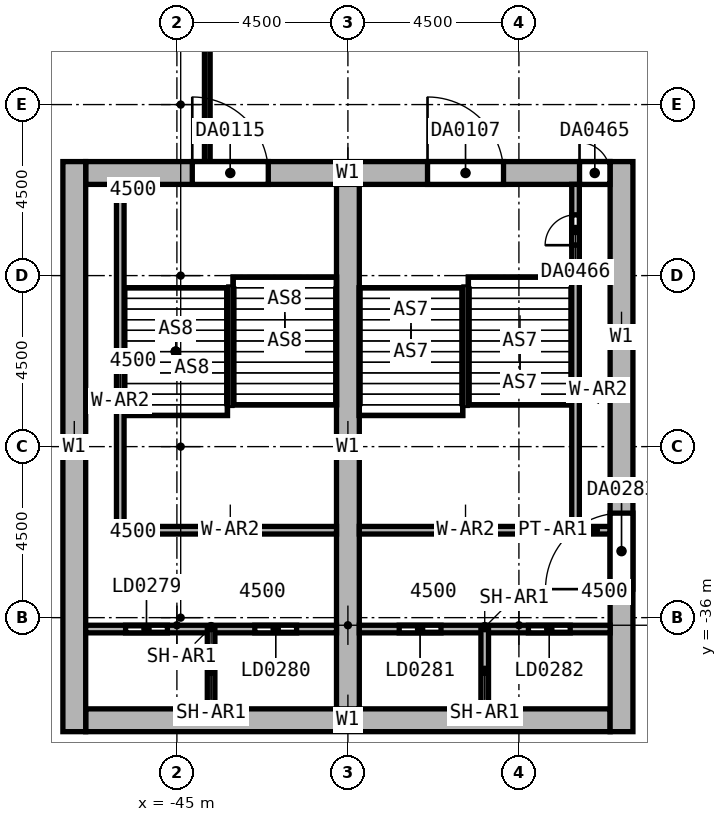
"""IFC4 building model, lengths in metres.
Left out: names, types, materials, properties, quantities, classifications, styles, units other than length and angle.
Written with IfcOpenShell. Run it as: python <this file> out.ifc"""

import sys

from ifc_helpers import new_model, si_unit, direction, frame, frame_2d, origin, place, context, subcontext, project, spatial, rectangle, extrude, element, fill, save


model = new_model("IFC4")
c1 = context("Model", 3, precision=1e-05, world=origin(), true_north=direction((0.0, 1.0)))
c2 = subcontext(c1, "Body", "Model", "MODEL_VIEW")
j1 = project(units=[si_unit("LENGTHUNIT", "METRE"), si_unit("PLANEANGLEUNIT", "RADIAN")], contexts=[c1])
p1 = place(None, origin())
s1 = spatial("IfcSite", under=j1, at=p1, CompositionType="ELEMENT")
p2 = place(p1, origin())
s2 = spatial("IfcBuilding", under=s1, at=p2, CompositionType="ELEMENT")
p3 = place(p2, frame((0.0, 0.0, 44.0)))
s3 = spatial("IfcBuildingStorey", under=s2, at=p3, CompositionType="ELEMENT", Elevation=44.0)
p4 = place(p3, frame((-47.4, -24.3, 0.0), z_axis=(0.0, 0.0, 1.0), x_axis=(1.0, 0.0, 0.0)))
e1 = element("IfcWall", 1, at=p4, inside=s3, PredefinedType="SHEAR", context=c2, shape_type="SweptSolid", body=[
    extrude(rectangle(XDim=13.8, YDim=0.6, at=frame_2d((6.9, 0.0))), origin(), (0.0, 0.0, 1.0), 8.0),
])
p5 = place(p4, frame((8.995, 0.0, 0.0)))
e2 = element("IfcOpeningElement", 2, at=p5, cuts=e1, PredefinedType="OPENING", context=c2, shape_type="SweptSolid", body=[
    extrude(rectangle(XDim=2.0, YDim=2.4, at=frame_2d((1.0, 1.2))), frame((0.0, 0.3, 0.0), z_axis=(0.0, -1.0, 0.0), x_axis=(1.0, 0.0, 0.0)), (0.0, 0.0, 1.0), 0.6),
])
p6 = place(p4, frame((2.805, 0.0, 0.0)))
e3 = element("IfcOpeningElement", 3, at=p6, cuts=e1, PredefinedType="OPENING", context=c2, shape_type="SweptSolid", body=[
    extrude(rectangle(XDim=2.0, YDim=2.4, at=frame_2d((1.0, 1.2))), frame((0.0, 0.3, 0.0), z_axis=(0.0, -1.0, 0.0), x_axis=(1.0, 0.0, 0.0)), (0.0, 0.0, 1.0), 0.6),
])
p7 = place(p4, frame((12.995, 0.0, 0.0)))
e4 = element("IfcOpeningElement", 4, at=p7, cuts=e1, PredefinedType="OPENING", context=c2, shape_type="SweptSolid", body=[
    extrude(rectangle(XDim=0.8, YDim=2.1, at=frame_2d((0.4, 1.05))), frame((0.0, 0.3, 0.0), z_axis=(0.0, -1.0, 0.0), x_axis=(1.0, 0.0, 0.0)), (0.0, 0.0, 1.0), 0.6),
])
p8 = place(p3, frame((-47.4, -38.7, 0.0), z_axis=(0.0, 0.0, 1.0), x_axis=(1.0, 0.0, 0.0)))
e5 = element("IfcWall", 5, at=p8, inside=s3, PredefinedType="SHEAR", context=c2, shape_type="SweptSolid", body=[
    extrude(rectangle(XDim=13.8, YDim=0.6, at=frame_2d((6.9, 0.0))), origin(), (0.0, 0.0, 1.0), 8.0),
])
p9 = place(p3, frame((-47.7, -39.0, 0.0), z_axis=(0.0, 0.0, 1.0), x_axis=(0.0, 1.0, 0.0)))
e6 = element("IfcWall", 6, at=p9, inside=s3, PredefinedType="SHEAR", context=c2, shape_type="SweptSolid", body=[
    extrude(rectangle(XDim=15.0, YDim=0.6, at=frame_2d((7.5, 0.0))), origin(), (0.0, 0.0, 1.0), 8.0),
])
p10 = place(p3, frame((-33.3, -39.0, 0.0), z_axis=(0.0, 0.0, 1.0), x_axis=(0.0, 1.0, 0.0)))
e7 = element("IfcWall", 7, at=p10, inside=s3, PredefinedType="SHEAR", context=c2, shape_type="SweptSolid", body=[
    extrude(rectangle(XDim=15.0, YDim=0.6, at=frame_2d((7.5, 0.0))), origin(), (0.0, 0.0, 1.0), 8.0),
])
p11 = place(p10, frame((3.75, 0.0, 0.0)))
e8 = element("IfcOpeningElement", 8, at=p11, cuts=e7, PredefinedType="OPENING", context=c2, shape_type="SweptSolid", body=[
    extrude(rectangle(XDim=2.0, YDim=2.4, at=frame_2d((1.0, 1.2))), frame((0.0, 0.3, 0.0), z_axis=(0.0, -1.0, 0.0), x_axis=(1.0, 0.0, 0.0)), (0.0, 0.0, 1.0), 0.6),
])
p12 = place(p3, frame((-40.5, -38.4, 0.0), z_axis=(0.0, 0.0, 1.0), x_axis=(0.0, 1.0, 0.0)))
e9 = element("IfcWall", 9, at=p12, inside=s3, PredefinedType="SHEAR", context=c2, shape_type="SweptSolid", body=[
    extrude(rectangle(XDim=13.8, YDim=0.6, at=frame_2d((6.9, 0.0))), origin(), (0.0, 0.0, 1.0), 8.0),
])
p13 = place(p3, frame((-34.51, -33.8, 0.0), z_axis=(0.0, 0.0, 1.0), x_axis=(0.0, 1.0, 0.0)))
e10 = element("IfcWall", 10, at=p13, inside=s3, PredefinedType="SOLIDWALL", context=c2, shape_type="SweptSolid", body=[
    extrude(rectangle(XDim=9.2, YDim=0.2, at=frame_2d((4.6, 0.0))), origin(), (0.0, 0.0, 1.0), 8.0),
])
p14 = place(p13, frame((7.6, 0.0, 0.0)))
e11 = element("IfcOpeningElement", 11, at=p14, cuts=e10, PredefinedType="OPENING", context=c2, shape_type="SweptSolid", body=[
    extrude(rectangle(XDim=0.8, YDim=2.1, at=frame_2d((0.4, 1.05))), frame((0.0, 0.1, 0.0), z_axis=(0.0, -1.0, 0.0), x_axis=(1.0, 0.0, 0.0)), (0.0, 0.0, 1.0), 0.2),
])
p15 = place(p3, frame((-40.2, -33.7, 0.0), z_axis=(0.0, 0.0, 1.0), x_axis=(1.0, 0.0, 0.0)))
e12 = element("IfcWall", 12, at=p15, inside=s3, PredefinedType="SOLIDWALL", context=c2, shape_type="SweptSolid", body=[
    extrude(rectangle(XDim=5.59, YDim=0.2, at=frame_2d((2.795, 0.0))), origin(), (0.0, 0.0, 1.0), 8.0),
])
p16 = place(p3, frame((-46.49, -33.8, 0.0), z_axis=(0.0, 0.0, 1.0), x_axis=(0.0, 1.0, 0.0)))
e13 = element("IfcWall", 13, at=p16, inside=s3, PredefinedType="SOLIDWALL", context=c2, shape_type="SweptSolid", body=[
    extrude(rectangle(XDim=9.2, YDim=0.2, at=frame_2d((4.6, 0.0))), origin(), (0.0, 0.0, 1.0), 8.0),
])
p17 = place(p3, frame((-46.39, -33.7, 0.0), z_axis=(0.0, 0.0, 1.0), x_axis=(1.0, 0.0, 0.0)))
e14 = element("IfcWall", 14, at=p17, inside=s3, PredefinedType="SOLIDWALL", context=c2, shape_type="SweptSolid", body=[
    extrude(rectangle(XDim=5.59, YDim=0.2, at=frame_2d((2.795, 0.0))), origin(), (0.0, 0.0, 1.0), 8.0),
])
p18 = place(p3, frame((-47.4, -36.3, 0.0), z_axis=(0.0, 0.0, 1.0), x_axis=(1.0, 0.0, 0.0)))
e15 = element("IfcWall", 15, at=p18, inside=s3, PredefinedType="SHEAR", context=c2, shape_type="SweptSolid", body=[
    extrude(rectangle(XDim=6.6, YDim=0.2, at=frame_2d((3.3, 0.0))), origin(), (0.0, 0.0, 1.0), 8.0),
])
p19 = place(p18, frame((1.05, 0.0, 0.0)))
e16 = element("IfcOpeningElement", 16, at=p19, cuts=e15, PredefinedType="OPENING", context=c2, shape_type="SweptSolid", body=[
    extrude(rectangle(XDim=1.1, YDim=2.4, at=frame_2d((0.55, 1.2))), frame((0.0, 0.1, 0.0), z_axis=(0.0, -1.0, 0.0), x_axis=(1.0, 0.0, 0.0)), (0.0, 0.0, 1.0), 0.2),
])
p20 = place(p18, frame((4.45, 0.0, 0.0)))
e17 = element("IfcOpeningElement", 17, at=p20, cuts=e15, PredefinedType="OPENING", context=c2, shape_type="SweptSolid", body=[
    extrude(rectangle(XDim=1.1, YDim=2.4, at=frame_2d((0.55, 1.2))), frame((0.0, 0.1, 0.0), z_axis=(0.0, -1.0, 0.0), x_axis=(1.0, 0.0, 0.0)), (0.0, 0.0, 1.0), 0.2),
])
p21 = place(p3, frame((-40.2, -36.3, 0.0), z_axis=(0.0, 0.0, 1.0), x_axis=(1.0, 0.0, 0.0)))
e18 = element("IfcWall", 18, at=p21, inside=s3, PredefinedType="SHEAR", context=c2, shape_type="SweptSolid", body=[
    extrude(rectangle(XDim=6.6, YDim=0.2, at=frame_2d((3.3, 0.0))), origin(), (0.0, 0.0, 1.0), 8.0),
])
p22 = place(p21, frame((1.05, 0.0, 0.0)))
e19 = element("IfcOpeningElement", 19, at=p22, cuts=e18, PredefinedType="OPENING", context=c2, shape_type="SweptSolid", body=[
    extrude(rectangle(XDim=1.1, YDim=2.4, at=frame_2d((0.55, 1.2))), frame((0.0, 0.1, 0.0), z_axis=(0.0, -1.0, 0.0), x_axis=(1.0, 0.0, 0.0)), (0.0, 0.0, 1.0), 0.2),
])
p23 = place(p21, frame((4.45, 0.0, 0.0)))
e20 = element("IfcOpeningElement", 20, at=p23, cuts=e18, PredefinedType="OPENING", context=c2, shape_type="SweptSolid", body=[
    extrude(rectangle(XDim=1.1, YDim=2.4, at=frame_2d((0.55, 1.2))), frame((0.0, 0.1, 0.0), z_axis=(0.0, -1.0, 0.0), x_axis=(1.0, 0.0, 0.0)), (0.0, 0.0, 1.0), 0.2),
])
for number, where, z_axis, x_axis in (
    (21, (-36.9, -38.4, 0.0), (0.0, 0.0, 1.0), (0.0, 1.0, 0.0)),
    (22, (-44.1, -38.4, 0.0), (0.0, 0.0, 1.0), (0.0, 1.0, 0.0)),
):
    element("IfcWall", number, at=place(p3, frame(where, z_axis=z_axis, x_axis=x_axis)), inside=s3, PredefinedType="SHEAR", context=c2, shape_type="SweptSolid", body=[
        extrude(rectangle(XDim=2.1, YDim=0.2, at=frame_2d((1.05, 0.0))), origin(), (0.0, 0.0, 1.0), 8.0),
    ])
p24 = place(p3, frame((-34.41, -33.7, 0.0), z_axis=(0.0, 0.0, 1.0), x_axis=(1.0, 0.0, 0.0)))
e23 = element("IfcWall", 23, at=p24, inside=s3, PredefinedType="PARTITIONING", context=c2, shape_type="SweptSolid", body=[
    extrude(rectangle(XDim=0.81, YDim=0.2, at=frame_2d((0.405, 0.0))), origin(), (0.0, 0.0, 1.0), 8.0),
])
p25 = place(p3, frame((-44.2, -24.0, 0.0), z_axis=(0.0, 0.0, 1.0), x_axis=(0.0, 1.0, 0.0)))
e24 = element("IfcWall", 24, at=p25, inside=s3, PredefinedType="SOLIDWALL", context=c2, shape_type="SweptSolid", body=[
    extrude(rectangle(XDim=9.0, YDim=0.15, at=frame_2d((4.5, 0.0))), origin(), (0.0, 0.0, 1.0), 7.7),
])
p26 = place(p5, frame((2.0, 0.0, 0.0), z_axis=(0.0, 0.0, 1.0), x_axis=(-1.0, 0.0, 0.0)))
e25 = element("IfcDoor", 25, at=p26, inside=s3, OperationType="DOUBLE_DOOR_SINGLE_SWING", PredefinedType="DOOR", context=c2, shape_type="SweptSolid", body=[
    extrude(rectangle(XDim=2.0, YDim=2.4, at=frame_2d((1.0, 1.2))), frame((0.0, 0.025, 0.0), z_axis=(0.0, -1.0, 0.0), x_axis=(1.0, 0.0, 0.0)), (0.0, 0.0, 1.0), 0.05),
])
fill(e2, e25)
p27 = place(p6, frame((2.0, 0.0, 0.0), z_axis=(0.0, 0.0, 1.0), x_axis=(-1.0, 0.0, 0.0)))
e26 = element("IfcDoor", 26, at=p27, inside=s3, OperationType="DOUBLE_DOOR_SINGLE_SWING", PredefinedType="DOOR", context=c2, shape_type="SweptSolid", body=[
    extrude(rectangle(XDim=2.0, YDim=2.4, at=frame_2d((1.0, 1.2))), frame((0.0, 0.025, 0.0), z_axis=(0.0, -1.0, 0.0), x_axis=(1.0, 0.0, 0.0)), (0.0, 0.0, 1.0), 0.05),
])
fill(e3, e26)
p28 = place(p19, frame((1.1, 0.0, 0.0), z_axis=(0.0, 0.0, 1.0), x_axis=(-1.0, 0.0, 0.0)))
e27 = element("IfcDoor", 27, at=p28, inside=s3, OperationType="DOUBLE_DOOR_SLIDING", PredefinedType="DOOR", context=c2, shape_type="SweptSolid", body=[
    extrude(rectangle(XDim=1.1, YDim=2.4, at=frame_2d((0.55, 1.2))), frame((0.0, 0.025, 0.0), z_axis=(0.0, -1.0, 0.0), x_axis=(1.0, 0.0, 0.0)), (0.0, 0.0, 1.0), 0.05),
])
fill(e16, e27)
p29 = place(p20, frame((1.1, 0.0, 0.0), z_axis=(0.0, 0.0, 1.0), x_axis=(-1.0, 0.0, 0.0)))
e28 = element("IfcDoor", 28, at=p29, inside=s3, OperationType="DOUBLE_DOOR_SLIDING", PredefinedType="DOOR", context=c2, shape_type="SweptSolid", body=[
    extrude(rectangle(XDim=1.1, YDim=2.4, at=frame_2d((0.55, 1.2))), frame((0.0, 0.025, 0.0), z_axis=(0.0, -1.0, 0.0), x_axis=(1.0, 0.0, 0.0)), (0.0, 0.0, 1.0), 0.05),
])
fill(e17, e28)
p30 = place(p22, frame((1.1, 0.0, 0.0), z_axis=(0.0, 0.0, 1.0), x_axis=(-1.0, 0.0, 0.0)))
e29 = element("IfcDoor", 29, at=p30, inside=s3, OperationType="DOUBLE_DOOR_SLIDING", PredefinedType="DOOR", context=c2, shape_type="SweptSolid", body=[
    extrude(rectangle(XDim=1.1, YDim=2.4, at=frame_2d((0.55, 1.2))), frame((0.0, 0.025, 0.0), z_axis=(0.0, -1.0, 0.0), x_axis=(1.0, 0.0, 0.0)), (0.0, 0.0, 1.0), 0.05),
])
fill(e19, e29)
p31 = place(p23, frame((1.1, 0.0, 0.0), z_axis=(0.0, 0.0, 1.0), x_axis=(-1.0, 0.0, 0.0)))
e30 = element("IfcDoor", 30, at=p31, inside=s3, OperationType="DOUBLE_DOOR_SLIDING", PredefinedType="DOOR", context=c2, shape_type="SweptSolid", body=[
    extrude(rectangle(XDim=1.1, YDim=2.4, at=frame_2d((0.55, 1.2))), frame((0.0, 0.025, 0.0), z_axis=(0.0, -1.0, 0.0), x_axis=(1.0, 0.0, 0.0)), (0.0, 0.0, 1.0), 0.05),
])
fill(e20, e30)
p32 = place(p11, origin())
e31 = element("IfcDoor", 31, at=p32, inside=s3, OperationType="DOUBLE_DOOR_SINGLE_SWING", PredefinedType="DOOR", context=c2, shape_type="SweptSolid", body=[
    extrude(rectangle(XDim=2.0, YDim=2.4, at=frame_2d((1.0, 1.2))), frame((0.0, 0.025, 0.0), z_axis=(0.0, -1.0, 0.0), x_axis=(1.0, 0.0, 0.0)), (0.0, 0.0, 1.0), 0.05),
])
fill(e8, e31)
p33 = place(p7, origin())
e32 = element("IfcDoor", 32, at=p33, inside=s3, OperationType="SINGLE_SWING_LEFT", PredefinedType="DOOR", context=c2, shape_type="SweptSolid", body=[
    extrude(rectangle(XDim=0.8, YDim=2.1, at=frame_2d((0.4, 1.05))), frame((0.0, 0.025, 0.0), z_axis=(0.0, -1.0, 0.0), x_axis=(1.0, 0.0, 0.0)), (0.0, 0.0, 1.0), 0.05),
])
fill(e4, e32)
p34 = place(p14, origin())
e33 = element("IfcDoor", 33, at=p34, inside=s3, OperationType="SINGLE_SWING_LEFT", PredefinedType="DOOR", context=c2, shape_type="SweptSolid", body=[
    extrude(rectangle(XDim=0.8, YDim=2.1, at=frame_2d((0.4, 1.05))), frame((0.0, 0.025, 0.0), z_axis=(0.0, -1.0, 0.0), x_axis=(1.0, 0.0, 0.0)), (0.0, 0.0, 1.0), 0.05),
])
fill(e11, e33)
save(model, sys.argv[1])
